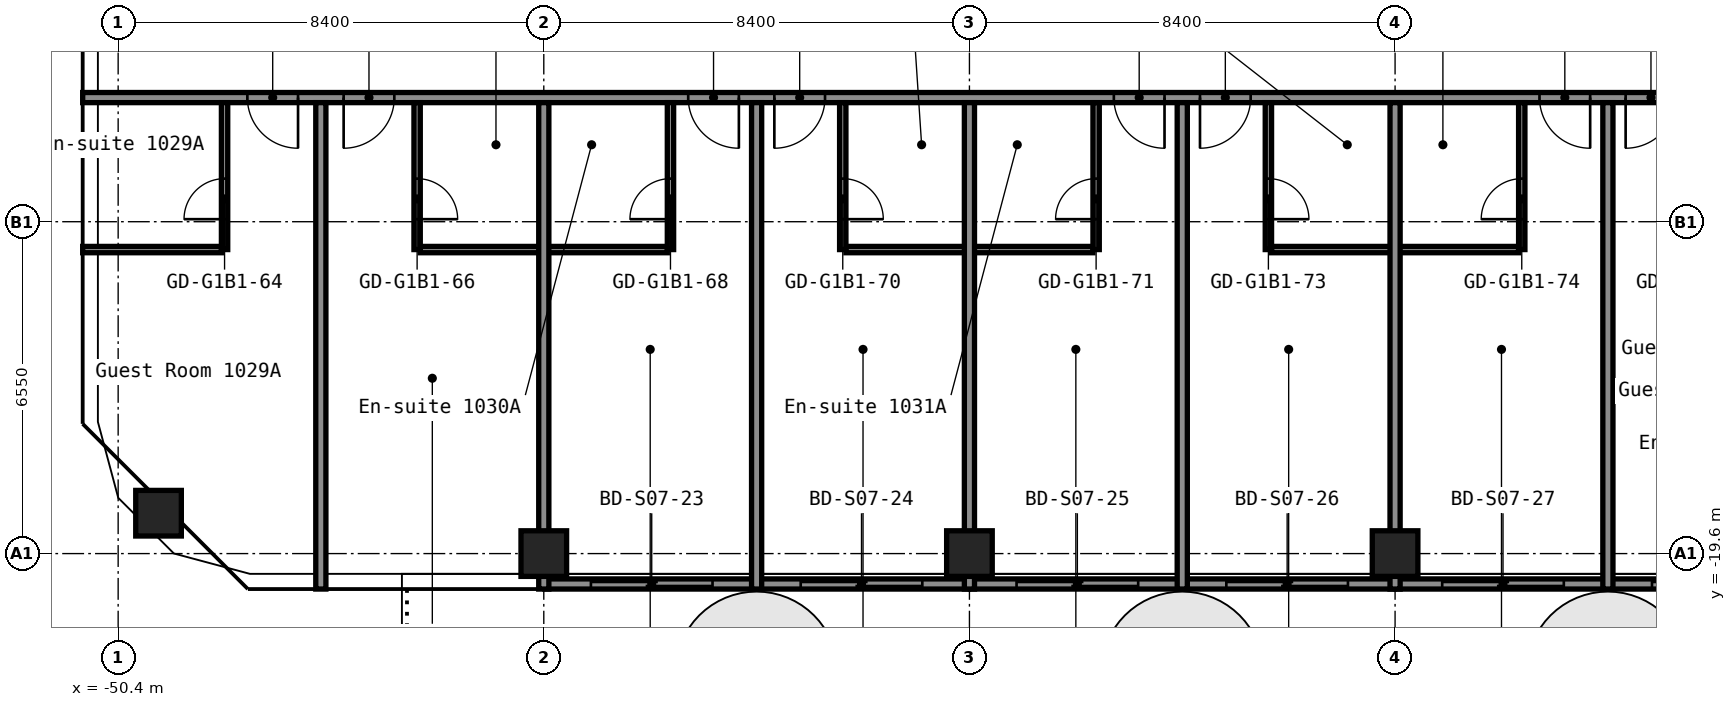
"""IFC4 building model, lengths in metres.
Left out: names, types, materials, properties, quantities, classifications, styles, units other than length and angle.
Written with IfcOpenShell. Run it as: python <this file> out.ifc"""

import sys

from ifc_helpers import new_model, si_unit, direction, frame, frame_2d, origin, origin_2d, place, context, subcontext, project, spatial, rectangle, hollow_rectangle, extrude, element, fill, save


model = new_model("IFC4")
c1 = context("Model", 3, precision=1e-05, world=origin(), true_north=direction((0.0, 1.0)))
c2 = subcontext(c1, "Body", "Model", "MODEL_VIEW")
j1 = project(units=[si_unit("LENGTHUNIT", "METRE"), si_unit("PLANEANGLEUNIT", "RADIAN")], contexts=[c1])
p1 = place(None, origin())
s1 = spatial("IfcSite", under=j1, at=p1, CompositionType="ELEMENT")
p2 = place(p1, origin())
s2 = spatial("IfcBuilding", under=s1, at=p2, CompositionType="ELEMENT")
p3 = place(p2, frame((0.0, 0.0, 39.0)))
s3 = spatial("IfcBuildingStorey", under=s2, at=p3, CompositionType="ELEMENT", Elevation=39.0)
for number, where, z_axis, x_axis in (
    (1, (-49.603, -18.803, 0.0), (0.0, 0.0, 1.0), (1.0, 0.0, 0.0)),
    (2, (-42.0, -19.6, 0.0), (0.0, 0.0, 1.0), (1.0, 0.0, 0.0)),
    (3, (-33.6, -19.6, 0.0), (0.0, 0.0, 1.0), (1.0, 0.0, 0.0)),
    (4, (-25.2, -19.6, 0.0), (0.0, 0.0, 1.0), (1.0, 0.0, 0.0)),
):
    element("IfcColumn", number, at=place(p3, frame(where, z_axis=z_axis, x_axis=x_axis)), inside=s3, PredefinedType="COLUMN", context=c2, shape_type="SweptSolid", body=[
        extrude(hollow_rectangle(XDim=0.9, YDim=0.9, WallThickness=0.036, at=origin_2d()), origin(), (0.0, 0.0, 1.0), 2.8),
    ])
p4 = place(p3, frame((-51.1, -13.6, 0.0), z_axis=(0.0, 0.0, 1.0), x_axis=(1.0, 0.0, 0.0)))
e5 = element("IfcWall", 5, at=p4, inside=s3, PredefinedType="PARTITIONING", context=c2, shape_type="SweptSolid", body=[
    extrude(rectangle(XDim=2.738, YDim=0.125, at=frame_2d((1.369, 0.0))), origin(), (0.0, 0.0, 1.0), 2.8),
])
for number, where, z_axis, x_axis in (
    (6, (-44.438, -13.6, 0.0), (0.0, 0.0, 1.0), (1.0, 0.0, 0.0)),
    (7, (-36.038, -13.6, 0.0), (0.0, 0.0, 1.0), (1.0, 0.0, 0.0)),
    (8, (-27.637, -13.6, 0.0), (0.0, 0.0, 1.0), (1.0, 0.0, 0.0)),
):
    element("IfcWall", number, at=place(p3, frame(where, z_axis=z_axis, x_axis=x_axis)), inside=s3, PredefinedType="PARTITIONING", context=c2, shape_type="SweptSolid", body=[
        extrude(rectangle(XDim=4.875, YDim=0.125, at=frame_2d((2.438, 0.0))), origin(), (0.0, 0.0, 1.0), 2.8),
    ])
p5 = place(p3, frame((-51.1, -10.6, 0.0), z_axis=(0.0, 0.0, 1.0), x_axis=(1.0, 0.0, 0.0)))
e9 = element("IfcWall", 9, at=p5, inside=s3, PredefinedType="PARTITIONING", context=c2, shape_type="SweptSolid", body=[
    extrude(rectangle(XDim=34.3, YDim=0.2, at=frame_2d((17.15, 0.0))), origin(), (0.0, 0.0, 1.0), 2.8),
])
p6 = place(p5, frame((3.25, 0.0, 0.0)))
e10 = element("IfcOpeningElement", 10, at=p6, cuts=e9, PredefinedType="OPENING", context=c2, shape_type="SweptSolid", body=[
    extrude(rectangle(XDim=1.0, YDim=2.1, at=frame_2d((0.5, 1.05))), frame((0.0, 0.11, 0.0), z_axis=(0.0, -1.0, 0.0), x_axis=(1.0, 0.0, 0.0)), (0.0, 0.0, 1.0), 0.22),
])
p7 = place(p5, frame((5.15, 0.0, 0.0)))
e11 = element("IfcOpeningElement", 11, at=p7, cuts=e9, PredefinedType="OPENING", context=c2, shape_type="SweptSolid", body=[
    extrude(rectangle(XDim=1.0, YDim=2.1, at=frame_2d((0.5, 1.05))), frame((0.0, 0.11, 0.0), z_axis=(0.0, -1.0, 0.0), x_axis=(1.0, 0.0, 0.0)), (0.0, 0.0, 1.0), 0.22),
])
p8 = place(p5, frame((11.95, 0.0, 0.0)))
e12 = element("IfcOpeningElement", 12, at=p8, cuts=e9, PredefinedType="OPENING", context=c2, shape_type="SweptSolid", body=[
    extrude(rectangle(XDim=1.0, YDim=2.1, at=frame_2d((0.5, 1.05))), frame((0.0, 0.11, 0.0), z_axis=(0.0, -1.0, 0.0), x_axis=(1.0, 0.0, 0.0)), (0.0, 0.0, 1.0), 0.22),
])
p9 = place(p5, frame((13.65, 0.0, 0.0)))
e13 = element("IfcOpeningElement", 13, at=p9, cuts=e9, PredefinedType="OPENING", context=c2, shape_type="SweptSolid", body=[
    extrude(rectangle(XDim=1.0, YDim=2.1, at=frame_2d((0.5, 1.05))), frame((0.0, 0.11, 0.0), z_axis=(0.0, -1.0, 0.0), x_axis=(1.0, 0.0, 0.0)), (0.0, 0.0, 1.0), 0.22),
])
p10 = place(p5, frame((20.35, 0.0, 0.0)))
e14 = element("IfcOpeningElement", 14, at=p10, cuts=e9, PredefinedType="OPENING", context=c2, shape_type="SweptSolid", body=[
    extrude(rectangle(XDim=1.0, YDim=2.1, at=frame_2d((0.5, 1.05))), frame((0.0, 0.11, 0.0), z_axis=(0.0, -1.0, 0.0), x_axis=(1.0, 0.0, 0.0)), (0.0, 0.0, 1.0), 0.22),
])
p11 = place(p5, frame((22.05, 0.0, 0.0)))
e15 = element("IfcOpeningElement", 15, at=p11, cuts=e9, PredefinedType="OPENING", context=c2, shape_type="SweptSolid", body=[
    extrude(rectangle(XDim=1.0, YDim=2.1, at=frame_2d((0.5, 1.05))), frame((0.0, 0.11, 0.0), z_axis=(0.0, -1.0, 0.0), x_axis=(1.0, 0.0, 0.0)), (0.0, 0.0, 1.0), 0.22),
])
p12 = place(p5, frame((28.75, 0.0, 0.0)))
e16 = element("IfcOpeningElement", 16, at=p12, cuts=e9, PredefinedType="OPENING", context=c2, shape_type="SweptSolid", body=[
    extrude(rectangle(XDim=1.0, YDim=2.1, at=frame_2d((0.5, 1.05))), frame((0.0, 0.11, 0.0), z_axis=(0.0, -1.0, 0.0), x_axis=(1.0, 0.0, 0.0)), (0.0, 0.0, 1.0), 0.22),
])
p13 = place(p5, frame((30.45, 0.0, 0.0)))
e17 = element("IfcOpeningElement", 17, at=p13, cuts=e9, PredefinedType="OPENING", context=c2, shape_type="SweptSolid", body=[
    extrude(rectangle(XDim=1.0, YDim=2.1, at=frame_2d((0.5, 1.05))), frame((0.0, 0.11, 0.0), z_axis=(0.0, -1.0, 0.0), x_axis=(1.0, 0.0, 0.0)), (0.0, 0.0, 1.0), 0.22),
])
p14 = place(p3, frame((-48.3, -13.6, 0.0), z_axis=(0.0, 0.0, 1.0), x_axis=(0.0, 1.0, 0.0)))
e18 = element("IfcWall", 18, at=p14, inside=s3, PredefinedType="PARTITIONING", context=c2, shape_type="SweptSolid", body=[
    extrude(rectangle(XDim=2.9, YDim=0.125, at=frame_2d((1.45, 0.0))), origin(), (0.0, 0.0, 1.0), 2.8),
])
p15 = place(p14, frame((0.6, 0.0, 0.0)))
e19 = element("IfcOpeningElement", 19, at=p15, cuts=e18, PredefinedType="OPENING", context=c2, shape_type="SweptSolid", body=[
    extrude(rectangle(XDim=0.8, YDim=2.1, at=frame_2d((0.4, 1.05))), frame((0.0, 0.073, 0.0), z_axis=(0.0, -1.0, 0.0), x_axis=(1.0, 0.0, 0.0)), (0.0, 0.0, 1.0), 0.145),
])
p16 = place(p3, frame((-46.4, -20.3, 0.0), z_axis=(0.0, 0.0, 1.0), x_axis=(0.0, 1.0, 0.0)))
e20 = element("IfcWall", 20, at=p16, inside=s3, PredefinedType="PARTITIONING", context=c2, shape_type="SweptSolid", body=[
    extrude(rectangle(XDim=9.6, YDim=0.2, at=frame_2d((4.8, 0.0))), origin(), (0.0, 0.0, 1.0), 2.8),
])
p17 = place(p3, frame((-44.5, -13.6, 0.0), z_axis=(0.0, 0.0, 1.0), x_axis=(0.0, 1.0, 0.0)))
e21 = element("IfcWall", 21, at=p17, inside=s3, PredefinedType="PARTITIONING", context=c2, shape_type="SweptSolid", body=[
    extrude(rectangle(XDim=2.9, YDim=0.125, at=frame_2d((1.45, 0.0))), origin(), (0.0, 0.0, 1.0), 2.8),
])
p18 = place(p17, frame((0.6, 0.0, 0.0)))
e22 = element("IfcOpeningElement", 22, at=p18, cuts=e21, PredefinedType="OPENING", context=c2, shape_type="SweptSolid", body=[
    extrude(rectangle(XDim=0.8, YDim=2.1, at=frame_2d((0.4, 1.05))), frame((0.0, 0.073, 0.0), z_axis=(0.0, -1.0, 0.0), x_axis=(1.0, 0.0, 0.0)), (0.0, 0.0, 1.0), 0.145),
])
p19 = place(p3, frame((-42.0, -20.3, 0.0), z_axis=(0.0, 0.0, 1.0), x_axis=(0.0, 1.0, 0.0)))
e23 = element("IfcWall", 23, at=p19, inside=s3, PredefinedType="PARTITIONING", context=c2, shape_type="SweptSolid", body=[
    extrude(rectangle(XDim=9.6, YDim=0.2, at=frame_2d((4.8, 0.0))), origin(), (0.0, 0.0, 1.0), 2.8),
])
p20 = place(p3, frame((-39.5, -13.6, 0.0), z_axis=(0.0, 0.0, 1.0), x_axis=(0.0, 1.0, 0.0)))
e24 = element("IfcWall", 24, at=p20, inside=s3, PredefinedType="PARTITIONING", context=c2, shape_type="SweptSolid", body=[
    extrude(rectangle(XDim=2.9, YDim=0.125, at=frame_2d((1.45, 0.0))), origin(), (0.0, 0.0, 1.0), 2.8),
])
p21 = place(p20, frame((0.6, 0.0, 0.0)))
e25 = element("IfcOpeningElement", 25, at=p21, cuts=e24, PredefinedType="OPENING", context=c2, shape_type="SweptSolid", body=[
    extrude(rectangle(XDim=0.8, YDim=2.1, at=frame_2d((0.4, 1.05))), frame((0.0, 0.073, 0.0), z_axis=(0.0, -1.0, 0.0), x_axis=(1.0, 0.0, 0.0)), (0.0, 0.0, 1.0), 0.145),
])
p22 = place(p3, frame((-37.8, -20.3, 0.0), z_axis=(0.0, 0.0, 1.0), x_axis=(0.0, 1.0, 0.0)))
e26 = element("IfcWall", 26, at=p22, inside=s3, PredefinedType="PARTITIONING", context=c2, shape_type="SweptSolid", body=[
    extrude(rectangle(XDim=9.6, YDim=0.2, at=frame_2d((4.8, 0.0))), origin(), (0.0, 0.0, 1.0), 2.8),
])
p23 = place(p3, frame((-36.1, -13.6, 0.0), z_axis=(0.0, 0.0, 1.0), x_axis=(0.0, 1.0, 0.0)))
e27 = element("IfcWall", 27, at=p23, inside=s3, PredefinedType="PARTITIONING", context=c2, shape_type="SweptSolid", body=[
    extrude(rectangle(XDim=2.9, YDim=0.125, at=frame_2d((1.45, 0.0))), origin(), (0.0, 0.0, 1.0), 2.8),
])
p24 = place(p23, frame((0.6, 0.0, 0.0)))
e28 = element("IfcOpeningElement", 28, at=p24, cuts=e27, PredefinedType="OPENING", context=c2, shape_type="SweptSolid", body=[
    extrude(rectangle(XDim=0.8, YDim=2.1, at=frame_2d((0.4, 1.05))), frame((0.0, 0.073, 0.0), z_axis=(0.0, -1.0, 0.0), x_axis=(1.0, 0.0, 0.0)), (0.0, 0.0, 1.0), 0.145),
])
p25 = place(p3, frame((-33.6, -20.3, 0.0), z_axis=(0.0, 0.0, 1.0), x_axis=(0.0, 1.0, 0.0)))
e29 = element("IfcWall", 29, at=p25, inside=s3, PredefinedType="PARTITIONING", context=c2, shape_type="SweptSolid", body=[
    extrude(rectangle(XDim=9.6, YDim=0.2, at=frame_2d((4.8, 0.0))), origin(), (0.0, 0.0, 1.0), 2.8),
])
p26 = place(p3, frame((-31.1, -13.6, 0.0), z_axis=(0.0, 0.0, 1.0), x_axis=(0.0, 1.0, 0.0)))
e30 = element("IfcWall", 30, at=p26, inside=s3, PredefinedType="PARTITIONING", context=c2, shape_type="SweptSolid", body=[
    extrude(rectangle(XDim=2.9, YDim=0.125, at=frame_2d((1.45, 0.0))), origin(), (0.0, 0.0, 1.0), 2.8),
])
p27 = place(p26, frame((0.6, 0.0, 0.0)))
e31 = element("IfcOpeningElement", 31, at=p27, cuts=e30, PredefinedType="OPENING", context=c2, shape_type="SweptSolid", body=[
    extrude(rectangle(XDim=0.8, YDim=2.1, at=frame_2d((0.4, 1.05))), frame((0.0, 0.073, 0.0), z_axis=(0.0, -1.0, 0.0), x_axis=(1.0, 0.0, 0.0)), (0.0, 0.0, 1.0), 0.145),
])
p28 = place(p3, frame((-29.4, -20.3, 0.0), z_axis=(0.0, 0.0, 1.0), x_axis=(0.0, 1.0, 0.0)))
e32 = element("IfcWall", 32, at=p28, inside=s3, PredefinedType="PARTITIONING", context=c2, shape_type="SweptSolid", body=[
    extrude(rectangle(XDim=9.6, YDim=0.2, at=frame_2d((4.8, 0.0))), origin(), (0.0, 0.0, 1.0), 2.8),
])
p29 = place(p3, frame((-27.7, -13.6, 0.0), z_axis=(0.0, 0.0, 1.0), x_axis=(0.0, 1.0, 0.0)))
e33 = element("IfcWall", 33, at=p29, inside=s3, PredefinedType="PARTITIONING", context=c2, shape_type="SweptSolid", body=[
    extrude(rectangle(XDim=2.9, YDim=0.125, at=frame_2d((1.45, 0.0))), origin(), (0.0, 0.0, 1.0), 2.8),
])
p30 = place(p29, frame((0.6, 0.0, 0.0)))
e34 = element("IfcOpeningElement", 34, at=p30, cuts=e33, PredefinedType="OPENING", context=c2, shape_type="SweptSolid", body=[
    extrude(rectangle(XDim=0.8, YDim=2.1, at=frame_2d((0.4, 1.05))), frame((0.0, 0.073, 0.0), z_axis=(0.0, -1.0, 0.0), x_axis=(1.0, 0.0, 0.0)), (0.0, 0.0, 1.0), 0.145),
])
p31 = place(p3, frame((-25.2, -20.3, 0.0), z_axis=(0.0, 0.0, 1.0), x_axis=(0.0, 1.0, 0.0)))
e35 = element("IfcWall", 35, at=p31, inside=s3, PredefinedType="PARTITIONING", context=c2, shape_type="SweptSolid", body=[
    extrude(rectangle(XDim=9.6, YDim=0.2, at=frame_2d((4.8, 0.0))), origin(), (0.0, 0.0, 1.0), 2.8),
])
p32 = place(p3, frame((-22.7, -13.6, 0.0), z_axis=(0.0, 0.0, 1.0), x_axis=(0.0, 1.0, 0.0)))
e36 = element("IfcWall", 36, at=p32, inside=s3, PredefinedType="PARTITIONING", context=c2, shape_type="SweptSolid", body=[
    extrude(rectangle(XDim=2.9, YDim=0.125, at=frame_2d((1.45, 0.0))), origin(), (0.0, 0.0, 1.0), 2.8),
])
p33 = place(p32, frame((0.6, 0.0, 0.0)))
e37 = element("IfcOpeningElement", 37, at=p33, cuts=e36, PredefinedType="OPENING", context=c2, shape_type="SweptSolid", body=[
    extrude(rectangle(XDim=0.8, YDim=2.1, at=frame_2d((0.4, 1.05))), frame((0.0, 0.073, 0.0), z_axis=(0.0, -1.0, 0.0), x_axis=(1.0, 0.0, 0.0)), (0.0, 0.0, 1.0), 0.145),
])
p34 = place(p3, frame((-21.0, -20.3, 0.0), z_axis=(0.0, 0.0, 1.0), x_axis=(0.0, 1.0, 0.0)))
e38 = element("IfcWall", 38, at=p34, inside=s3, PredefinedType="PARTITIONING", context=c2, shape_type="SweptSolid", body=[
    extrude(rectangle(XDim=9.6, YDim=0.2, at=frame_2d((4.8, 0.0))), origin(), (0.0, 0.0, 1.0), 2.8),
])
p35 = place(p3, frame((-41.98, -20.2, 0.0), z_axis=(0.0, 0.0, 1.0), x_axis=(1.0, 0.0, 0.0)))
p36 = place(p35, frame((0.91, 0.0, 0.0)))
p37 = place(p36, frame((2.4, 0.0, 0.0), z_axis=(0.0, 0.0, 1.0), x_axis=(-1.0, 0.0, 0.0)))
e39 = element("IfcDoor", 39, at=p37, inside=s3, OperationType="SLIDING_TO_LEFT", PredefinedType="DOOR", context=c2, shape_type="SweptSolid", body=[
    extrude(rectangle(XDim=2.4, YDim=2.2, at=frame_2d((1.2, 1.1))), frame((0.0, 0.025, 0.0), z_axis=(0.0, -1.0, 0.0), x_axis=(1.0, 0.0, 0.0)), (0.0, 0.0, 1.0), 0.05),
])
p38 = place(p3, frame((-37.84, -20.2, 0.0), z_axis=(0.0, 0.0, 1.0), x_axis=(1.0, 0.0, 0.0)))
p39 = place(p38, frame((0.91, 0.0, 0.0)))
p40 = place(p39, frame((2.4, 0.0, 0.0), z_axis=(0.0, 0.0, 1.0), x_axis=(-1.0, 0.0, 0.0)))
e40 = element("IfcDoor", 40, at=p40, inside=s3, OperationType="SLIDING_TO_LEFT", PredefinedType="DOOR", context=c2, shape_type="SweptSolid", body=[
    extrude(rectangle(XDim=2.4, YDim=2.2, at=frame_2d((1.2, 1.1))), frame((0.0, 0.025, 0.0), z_axis=(0.0, -1.0, 0.0), x_axis=(1.0, 0.0, 0.0)), (0.0, 0.0, 1.0), 0.05),
])
p41 = place(p3, frame((-33.58, -20.2, 0.0), z_axis=(0.0, 0.0, 1.0), x_axis=(1.0, 0.0, 0.0)))
p42 = place(p41, frame((0.91, 0.0, 0.0)))
p43 = place(p42, frame((2.4, 0.0, 0.0), z_axis=(0.0, 0.0, 1.0), x_axis=(-1.0, 0.0, 0.0)))
e41 = element("IfcDoor", 41, at=p43, inside=s3, OperationType="SLIDING_TO_LEFT", PredefinedType="DOOR", context=c2, shape_type="SweptSolid", body=[
    extrude(rectangle(XDim=2.4, YDim=2.2, at=frame_2d((1.2, 1.1))), frame((0.0, 0.025, 0.0), z_axis=(0.0, -1.0, 0.0), x_axis=(1.0, 0.0, 0.0)), (0.0, 0.0, 1.0), 0.05),
])
p44 = place(p3, frame((-29.44, -20.2, 0.0), z_axis=(0.0, 0.0, 1.0), x_axis=(1.0, 0.0, 0.0)))
p45 = place(p44, frame((0.91, 0.0, 0.0)))
p46 = place(p45, frame((2.4, 0.0, 0.0), z_axis=(0.0, 0.0, 1.0), x_axis=(-1.0, 0.0, 0.0)))
e42 = element("IfcDoor", 42, at=p46, inside=s3, OperationType="SLIDING_TO_LEFT", PredefinedType="DOOR", context=c2, shape_type="SweptSolid", body=[
    extrude(rectangle(XDim=2.4, YDim=2.2, at=frame_2d((1.2, 1.1))), frame((0.0, 0.025, 0.0), z_axis=(0.0, -1.0, 0.0), x_axis=(1.0, 0.0, 0.0)), (0.0, 0.0, 1.0), 0.05),
])
p47 = place(p3, frame((-25.18, -20.2, 0.0), z_axis=(0.0, 0.0, 1.0), x_axis=(1.0, 0.0, 0.0)))
p48 = place(p47, frame((0.91, 0.0, 0.0)))
p49 = place(p48, frame((2.4, 0.0, 0.0), z_axis=(0.0, 0.0, 1.0), x_axis=(-1.0, 0.0, 0.0)))
e43 = element("IfcDoor", 43, at=p49, inside=s3, OperationType="SLIDING_TO_LEFT", PredefinedType="DOOR", context=c2, shape_type="SweptSolid", body=[
    extrude(rectangle(XDim=2.4, YDim=2.2, at=frame_2d((1.2, 1.1))), frame((0.0, 0.025, 0.0), z_axis=(0.0, -1.0, 0.0), x_axis=(1.0, 0.0, 0.0)), (0.0, 0.0, 1.0), 0.05),
])
p50 = place(p3, frame((-21.04, -20.2, 0.0), z_axis=(0.0, 0.0, 1.0), x_axis=(1.0, 0.0, 0.0)))
p51 = place(p50, frame((0.91, 0.0, 0.0)))
p52 = place(p51, frame((2.4, 0.0, 0.0), z_axis=(0.0, 0.0, 1.0), x_axis=(-1.0, 0.0, 0.0)))
e44 = element("IfcDoor", 44, at=p52, inside=s3, OperationType="SLIDING_TO_LEFT", PredefinedType="DOOR", context=c2, shape_type="SweptSolid", body=[
    extrude(rectangle(XDim=2.4, YDim=2.2, at=frame_2d((1.2, 1.1))), frame((0.0, 0.025, 0.0), z_axis=(0.0, -1.0, 0.0), x_axis=(1.0, 0.0, 0.0)), (0.0, 0.0, 1.0), 0.05),
])
p53 = place(p6, origin())
e45 = element("IfcDoor", 45, at=p53, inside=s3, OperationType="SINGLE_SWING_RIGHT", PredefinedType="DOOR", context=c2, shape_type="SweptSolid", body=[
    extrude(rectangle(XDim=1.0, YDim=2.1, at=frame_2d((0.5, 1.05))), frame((0.0, 0.025, 0.0), z_axis=(0.0, -1.0, 0.0), x_axis=(1.0, 0.0, 0.0)), (0.0, 0.0, 1.0), 0.05),
])
fill(e10, e45)
p54 = place(p7, origin())
e46 = element("IfcDoor", 46, at=p54, inside=s3, OperationType="SINGLE_SWING_LEFT", PredefinedType="DOOR", context=c2, shape_type="SweptSolid", body=[
    extrude(rectangle(XDim=1.0, YDim=2.1, at=frame_2d((0.5, 1.05))), frame((0.0, 0.025, 0.0), z_axis=(0.0, -1.0, 0.0), x_axis=(1.0, 0.0, 0.0)), (0.0, 0.0, 1.0), 0.05),
])
fill(e11, e46)
p55 = place(p8, origin())
e47 = element("IfcDoor", 47, at=p55, inside=s3, OperationType="SINGLE_SWING_RIGHT", PredefinedType="DOOR", context=c2, shape_type="SweptSolid", body=[
    extrude(rectangle(XDim=1.0, YDim=2.1, at=frame_2d((0.5, 1.05))), frame((0.0, 0.025, 0.0), z_axis=(0.0, -1.0, 0.0), x_axis=(1.0, 0.0, 0.0)), (0.0, 0.0, 1.0), 0.05),
])
fill(e12, e47)
p56 = place(p9, origin())
e48 = element("IfcDoor", 48, at=p56, inside=s3, OperationType="SINGLE_SWING_LEFT", PredefinedType="DOOR", context=c2, shape_type="SweptSolid", body=[
    extrude(rectangle(XDim=1.0, YDim=2.1, at=frame_2d((0.5, 1.05))), frame((0.0, 0.025, 0.0), z_axis=(0.0, -1.0, 0.0), x_axis=(1.0, 0.0, 0.0)), (0.0, 0.0, 1.0), 0.05),
])
fill(e13, e48)
p57 = place(p10, origin())
e49 = element("IfcDoor", 49, at=p57, inside=s3, OperationType="SINGLE_SWING_RIGHT", PredefinedType="DOOR", context=c2, shape_type="SweptSolid", body=[
    extrude(rectangle(XDim=1.0, YDim=2.1, at=frame_2d((0.5, 1.05))), frame((0.0, 0.025, 0.0), z_axis=(0.0, -1.0, 0.0), x_axis=(1.0, 0.0, 0.0)), (0.0, 0.0, 1.0), 0.05),
])
fill(e14, e49)
p58 = place(p11, origin())
e50 = element("IfcDoor", 50, at=p58, inside=s3, OperationType="SINGLE_SWING_LEFT", PredefinedType="DOOR", context=c2, shape_type="SweptSolid", body=[
    extrude(rectangle(XDim=1.0, YDim=2.1, at=frame_2d((0.5, 1.05))), frame((0.0, 0.025, 0.0), z_axis=(0.0, -1.0, 0.0), x_axis=(1.0, 0.0, 0.0)), (0.0, 0.0, 1.0), 0.05),
])
fill(e15, e50)
p59 = place(p12, origin())
e51 = element("IfcDoor", 51, at=p59, inside=s3, OperationType="SINGLE_SWING_RIGHT", PredefinedType="DOOR", context=c2, shape_type="SweptSolid", body=[
    extrude(rectangle(XDim=1.0, YDim=2.1, at=frame_2d((0.5, 1.05))), frame((0.0, 0.025, 0.0), z_axis=(0.0, -1.0, 0.0), x_axis=(1.0, 0.0, 0.0)), (0.0, 0.0, 1.0), 0.05),
])
fill(e16, e51)
p60 = place(p13, origin())
e52 = element("IfcDoor", 52, at=p60, inside=s3, OperationType="SINGLE_SWING_LEFT", PredefinedType="DOOR", context=c2, shape_type="SweptSolid", body=[
    extrude(rectangle(XDim=1.0, YDim=2.1, at=frame_2d((0.5, 1.05))), frame((0.0, 0.025, 0.0), z_axis=(0.0, -1.0, 0.0), x_axis=(1.0, 0.0, 0.0)), (0.0, 0.0, 1.0), 0.05),
])
fill(e17, e52)
p61 = place(p15, origin())
e53 = element("IfcDoor", 53, at=p61, inside=s3, OperationType="SINGLE_SWING_RIGHT", PredefinedType="DOOR", context=c2, shape_type="SweptSolid", body=[
    extrude(rectangle(XDim=0.8, YDim=2.1, at=frame_2d((0.4, 1.05))), frame((0.0, 0.025, 0.0), z_axis=(0.0, -1.0, 0.0), x_axis=(1.0, 0.0, 0.0)), (0.0, 0.0, 1.0), 0.05),
])
fill(e19, e53)
p62 = place(p18, origin())
e54 = element("IfcDoor", 54, at=p62, inside=s3, OperationType="SINGLE_SWING_LEFT", PredefinedType="DOOR", context=c2, shape_type="SweptSolid", body=[
    extrude(rectangle(XDim=0.8, YDim=2.1, at=frame_2d((0.4, 1.05))), frame((0.0, 0.025, 0.0), z_axis=(0.0, -1.0, 0.0), x_axis=(1.0, 0.0, 0.0)), (0.0, 0.0, 1.0), 0.05),
])
fill(e22, e54)
p63 = place(p21, origin())
e55 = element("IfcDoor", 55, at=p63, inside=s3, OperationType="SINGLE_SWING_RIGHT", PredefinedType="DOOR", context=c2, shape_type="SweptSolid", body=[
    extrude(rectangle(XDim=0.8, YDim=2.1, at=frame_2d((0.4, 1.05))), frame((0.0, 0.025, 0.0), z_axis=(0.0, -1.0, 0.0), x_axis=(1.0, 0.0, 0.0)), (0.0, 0.0, 1.0), 0.05),
])
fill(e25, e55)
p64 = place(p24, origin())
e56 = element("IfcDoor", 56, at=p64, inside=s3, OperationType="SINGLE_SWING_LEFT", PredefinedType="DOOR", context=c2, shape_type="SweptSolid", body=[
    extrude(rectangle(XDim=0.8, YDim=2.1, at=frame_2d((0.4, 1.05))), frame((0.0, 0.025, 0.0), z_axis=(0.0, -1.0, 0.0), x_axis=(1.0, 0.0, 0.0)), (0.0, 0.0, 1.0), 0.05),
])
fill(e28, e56)
p65 = place(p27, origin())
e57 = element("IfcDoor", 57, at=p65, inside=s3, OperationType="SINGLE_SWING_RIGHT", PredefinedType="DOOR", context=c2, shape_type="SweptSolid", body=[
    extrude(rectangle(XDim=0.8, YDim=2.1, at=frame_2d((0.4, 1.05))), frame((0.0, 0.025, 0.0), z_axis=(0.0, -1.0, 0.0), x_axis=(1.0, 0.0, 0.0)), (0.0, 0.0, 1.0), 0.05),
])
fill(e31, e57)
p66 = place(p30, origin())
e58 = element("IfcDoor", 58, at=p66, inside=s3, OperationType="SINGLE_SWING_LEFT", PredefinedType="DOOR", context=c2, shape_type="SweptSolid", body=[
    extrude(rectangle(XDim=0.8, YDim=2.1, at=frame_2d((0.4, 1.05))), frame((0.0, 0.025, 0.0), z_axis=(0.0, -1.0, 0.0), x_axis=(1.0, 0.0, 0.0)), (0.0, 0.0, 1.0), 0.05),
])
fill(e34, e58)
p67 = place(p33, origin())
e59 = element("IfcDoor", 59, at=p67, inside=s3, OperationType="SINGLE_SWING_RIGHT", PredefinedType="DOOR", context=c2, shape_type="SweptSolid", body=[
    extrude(rectangle(XDim=0.8, YDim=2.1, at=frame_2d((0.4, 1.05))), frame((0.0, 0.025, 0.0), z_axis=(0.0, -1.0, 0.0), x_axis=(1.0, 0.0, 0.0)), (0.0, 0.0, 1.0), 0.05),
])
fill(e37, e59)
save(model, sys.argv[1])
